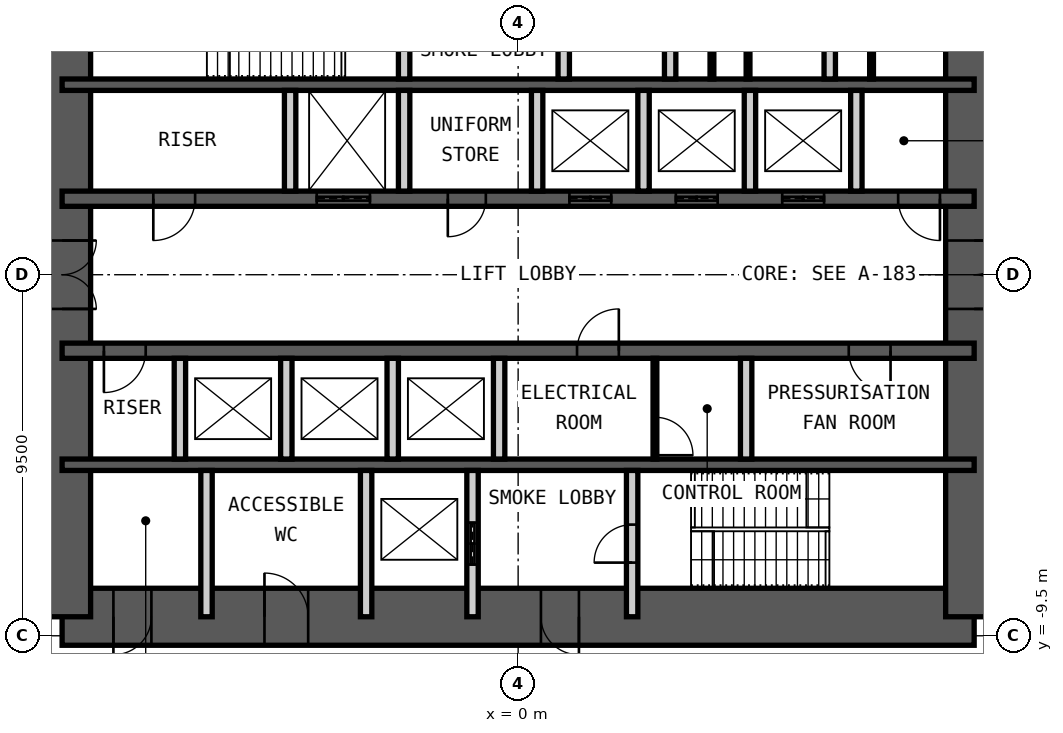
"""IFC4 building model, lengths in metres.
Left out: names, types, materials, properties, quantities, classifications, styles, units other than length and angle.
Written with IfcOpenShell. Run it as: python <this file> out.ifc"""

import sys

from ifc_helpers import new_model, si_unit, direction, frame, frame_2d, origin, place, context, subcontext, project, spatial, rectangle, extrude, element, fill, save


model = new_model("IFC4")
c1 = context("Model", 3, precision=1e-05, world=origin(), true_north=direction((0.0, 1.0)))
c2 = subcontext(c1, "Body", "Model", "MODEL_VIEW")
j1 = project(units=[si_unit("LENGTHUNIT", "METRE"), si_unit("PLANEANGLEUNIT", "RADIAN")], contexts=[c1])
p1 = place(None, origin())
s1 = spatial("IfcSite", under=j1, at=p1, CompositionType="ELEMENT")
p2 = place(p1, origin())
s2 = spatial("IfcBuilding", under=s1, at=p2, CompositionType="ELEMENT")
p3 = place(p2, frame((0.0, 0.0, 42.0)))
s3 = spatial("IfcBuildingStorey", under=s2, at=p3, CompositionType="ELEMENT", Elevation=42.0)
p4 = place(p3, frame((-12.0, -9.0, 0.0), z_axis=(0.0, 0.0, 1.0), x_axis=(1.0, 0.0, 0.0)))
e1 = element("IfcWall", 1, at=p4, inside=s3, PredefinedType="SHEAR", context=c2, shape_type="SweptSolid", body=[
    extrude(rectangle(XDim=24.0, YDim=1.5, at=frame_2d((12.0, 0.0))), origin(), (0.0, 0.0, 1.0), 5.0),
])
p5 = place(p4, frame((1.35, 0.0, 0.0)))
e2 = element("IfcOpeningElement", 2, at=p5, cuts=e1, PredefinedType="OPENING", context=c2, shape_type="SweptSolid", body=[
    extrude(rectangle(XDim=1.0, YDim=2.1, at=frame_2d((0.5, 1.05))), frame((0.0, 0.76, 0.0), z_axis=(0.0, -1.0, 0.0), x_axis=(1.0, 0.0, 0.0)), (0.0, 0.0, 1.0), 1.52),
])
p6 = place(p4, frame((5.325, 0.0, 0.0)))
e3 = element("IfcOpeningElement", 3, at=p6, cuts=e1, PredefinedType="OPENING", context=c2, shape_type="SweptSolid", body=[
    extrude(rectangle(XDim=1.15, YDim=2.1, at=frame_2d((0.575, 1.05))), frame((0.0, 0.76, 0.0), z_axis=(0.0, -1.0, 0.0), x_axis=(1.0, 0.0, 0.0)), (0.0, 0.0, 1.0), 1.52),
])
p7 = place(p4, frame((12.6, 0.0, 0.0)))
e4 = element("IfcOpeningElement", 4, at=p7, cuts=e1, PredefinedType="OPENING", context=c2, shape_type="SweptSolid", body=[
    extrude(rectangle(XDim=1.0, YDim=2.1, at=frame_2d((0.5, 1.05))), frame((0.0, 0.76, 0.0), z_axis=(0.0, -1.0, 0.0), x_axis=(1.0, 0.0, 0.0)), (0.0, 0.0, 1.0), 1.52),
])
p8 = place(p3, frame((12.0, -9.0, 0.0), z_axis=(0.0, 0.0, 1.0), x_axis=(0.0, 1.0, 0.0)))
e5 = element("IfcWall", 5, at=p8, inside=s3, PredefinedType="SHEAR", context=c2, shape_type="SweptSolid", body=[
    extrude(rectangle(XDim=18.0, YDim=1.5, at=frame_2d((9.0, 0.0))), origin(), (0.0, 0.0, 1.0), 5.0),
])
p9 = place(p8, frame((8.1, 0.0, 0.0)))
e6 = element("IfcOpeningElement", 6, at=p9, cuts=e5, PredefinedType="OPENING", context=c2, shape_type="SweptSolid", body=[
    extrude(rectangle(XDim=1.8, YDim=2.1, at=frame_2d((0.9, 1.05))), frame((0.0, 0.76, 0.0), z_axis=(0.0, -1.0, 0.0), x_axis=(1.0, 0.0, 0.0)), (0.0, 0.0, 1.0), 1.52),
])
p10 = place(p3, frame((-12.0, -9.0, 0.0), z_axis=(0.0, 0.0, 1.0), x_axis=(0.0, 1.0, 0.0)))
e7 = element("IfcWall", 7, at=p10, inside=s3, PredefinedType="SHEAR", context=c2, shape_type="SweptSolid", body=[
    extrude(rectangle(XDim=18.0, YDim=1.5, at=frame_2d((9.0, 0.0))), origin(), (0.0, 0.0, 1.0), 5.0),
])
p11 = place(p10, frame((8.1, 0.0, 0.0)))
e8 = element("IfcOpeningElement", 8, at=p11, cuts=e7, PredefinedType="OPENING", context=c2, shape_type="SweptSolid", body=[
    extrude(rectangle(XDim=1.8, YDim=2.1, at=frame_2d((0.9, 1.05))), frame((0.0, 0.76, 0.0), z_axis=(0.0, -1.0, 0.0), x_axis=(1.0, 0.0, 0.0)), (0.0, 0.0, 1.0), 1.52),
])
p12 = place(p3, frame((-12.0, 5.0, 0.0), z_axis=(0.0, 0.0, 1.0), x_axis=(1.0, 0.0, 0.0)))
e9 = element("IfcWall", 9, at=p12, inside=s3, PredefinedType="SHEAR", context=c2, shape_type="SweptSolid", body=[
    extrude(rectangle(XDim=24.0, YDim=0.3, at=frame_2d((12.0, 0.0))), origin(), (0.0, 0.0, 1.0), 5.0),
])
p13 = place(p3, frame((-12.0, 2.0, 0.0), z_axis=(0.0, 0.0, 1.0), x_axis=(1.0, 0.0, 0.0)))
e10 = element("IfcWall", 10, at=p13, inside=s3, PredefinedType="SHEAR", context=c2, shape_type="SweptSolid", body=[
    extrude(rectangle(XDim=24.0, YDim=0.4, at=frame_2d((12.0, 0.0))), origin(), (0.0, 0.0, 1.0), 5.0),
])
p14 = place(p13, frame((2.4, 0.0, 0.0)))
e11 = element("IfcOpeningElement", 11, at=p14, cuts=e10, PredefinedType="OPENING", context=c2, shape_type="SweptSolid", body=[
    extrude(rectangle(XDim=1.1, YDim=2.1, at=frame_2d((0.55, 1.05))), frame((0.0, 0.21, 0.0), z_axis=(0.0, -1.0, 0.0), x_axis=(1.0, 0.0, 0.0)), (0.0, 0.0, 1.0), 0.42),
])
p15 = place(p13, frame((22.0, 0.0, 0.0)))
e12 = element("IfcOpeningElement", 12, at=p15, cuts=e10, PredefinedType="OPENING", context=c2, shape_type="SweptSolid", body=[
    extrude(rectangle(XDim=1.1, YDim=2.1, at=frame_2d((0.55, 1.05))), frame((0.0, 0.21, 0.0), z_axis=(0.0, -1.0, 0.0), x_axis=(1.0, 0.0, 0.0)), (0.0, 0.0, 1.0), 0.42),
])
p16 = place(p13, frame((10.15, 0.0, 0.0)))
e13 = element("IfcOpeningElement", 13, at=p16, cuts=e10, PredefinedType="OPENING", context=c2, shape_type="SweptSolid", body=[
    extrude(rectangle(XDim=1.0, YDim=2.1, at=frame_2d((0.5, 1.05))), frame((0.0, 0.21, 0.0), z_axis=(0.0, -1.0, 0.0), x_axis=(1.0, 0.0, 0.0)), (0.0, 0.0, 1.0), 0.42),
])
p17 = place(p13, frame((6.7, 0.0, 0.0)))
e14 = element("IfcOpeningElement", 14, at=p17, cuts=e10, PredefinedType="OPENING", context=c2, shape_type="SweptSolid", body=[
    extrude(rectangle(XDim=1.4, YDim=2.4, at=frame_2d((0.7, 1.2))), frame((0.0, 0.21, 0.0), z_axis=(0.0, -1.0, 0.0), x_axis=(1.0, 0.0, 0.0)), (0.0, 0.0, 1.0), 0.42),
])
p18 = place(p13, frame((13.35, 0.0, 0.0)))
e15 = element("IfcOpeningElement", 15, at=p18, cuts=e10, PredefinedType="OPENING", context=c2, shape_type="SweptSolid", body=[
    extrude(rectangle(XDim=1.1, YDim=2.4, at=frame_2d((0.55, 1.2))), frame((0.0, 0.21, 0.0), z_axis=(0.0, -1.0, 0.0), x_axis=(1.0, 0.0, 0.0)), (0.0, 0.0, 1.0), 0.42),
])
p19 = place(p13, frame((16.15, 0.0, 0.0)))
e16 = element("IfcOpeningElement", 16, at=p19, cuts=e10, PredefinedType="OPENING", context=c2, shape_type="SweptSolid", body=[
    extrude(rectangle(XDim=1.1, YDim=2.4, at=frame_2d((0.55, 1.2))), frame((0.0, 0.21, 0.0), z_axis=(0.0, -1.0, 0.0), x_axis=(1.0, 0.0, 0.0)), (0.0, 0.0, 1.0), 0.42),
])
p20 = place(p13, frame((18.95, 0.0, 0.0)))
e17 = element("IfcOpeningElement", 17, at=p20, cuts=e10, PredefinedType="OPENING", context=c2, shape_type="SweptSolid", body=[
    extrude(rectangle(XDim=1.1, YDim=2.4, at=frame_2d((0.55, 1.2))), frame((0.0, 0.21, 0.0), z_axis=(0.0, -1.0, 0.0), x_axis=(1.0, 0.0, 0.0)), (0.0, 0.0, 1.0), 0.42),
])
p21 = place(p3, frame((-12.0, -2.0, 0.0), z_axis=(0.0, 0.0, 1.0), x_axis=(1.0, 0.0, 0.0)))
e18 = element("IfcWall", 18, at=p21, inside=s3, PredefinedType="SHEAR", context=c2, shape_type="SweptSolid", body=[
    extrude(rectangle(XDim=24.0, YDim=0.4, at=frame_2d((12.0, 0.0))), origin(), (0.0, 0.0, 1.0), 5.0),
])
p22 = place(p21, frame((1.1, 0.0, 0.0)))
e19 = element("IfcOpeningElement", 19, at=p22, cuts=e18, PredefinedType="OPENING", context=c2, shape_type="SweptSolid", body=[
    extrude(rectangle(XDim=1.1, YDim=2.1, at=frame_2d((0.55, 1.05))), frame((0.0, 0.21, 0.0), z_axis=(0.0, -1.0, 0.0), x_axis=(1.0, 0.0, 0.0)), (0.0, 0.0, 1.0), 0.42),
])
p23 = place(p21, frame((13.55, 0.0, 0.0)))
e20 = element("IfcOpeningElement", 20, at=p23, cuts=e18, PredefinedType="OPENING", context=c2, shape_type="SweptSolid", body=[
    extrude(rectangle(XDim=1.1, YDim=2.1, at=frame_2d((0.55, 1.05))), frame((0.0, 0.21, 0.0), z_axis=(0.0, -1.0, 0.0), x_axis=(1.0, 0.0, 0.0)), (0.0, 0.0, 1.0), 0.42),
])
p24 = place(p21, frame((20.7, 0.0, 0.0)))
e21 = element("IfcOpeningElement", 21, at=p24, cuts=e18, PredefinedType="OPENING", context=c2, shape_type="SweptSolid", body=[
    extrude(rectangle(XDim=1.1, YDim=2.1, at=frame_2d((0.55, 1.05))), frame((0.0, 0.21, 0.0), z_axis=(0.0, -1.0, 0.0), x_axis=(1.0, 0.0, 0.0)), (0.0, 0.0, 1.0), 0.42),
])
p25 = place(p3, frame((-12.0, -5.0, 0.0), z_axis=(0.0, 0.0, 1.0), x_axis=(1.0, 0.0, 0.0)))
e22 = element("IfcWall", 22, at=p25, inside=s3, PredefinedType="SHEAR", context=c2, shape_type="SweptSolid", body=[
    extrude(rectangle(XDim=24.0, YDim=0.3, at=frame_2d((12.0, 0.0))), origin(), (0.0, 0.0, 1.0), 5.0),
])
p26 = place(p3, frame((-3.0, 5.15, 0.0), z_axis=(0.0, 0.0, 1.0), x_axis=(0.0, 1.0, 0.0)))
e23 = element("IfcWall", 23, at=p26, inside=s3, PredefinedType="PARTITIONING", context=c2, shape_type="SweptSolid", body=[
    extrude(rectangle(XDim=3.85, YDim=0.3, at=frame_2d((1.925, 0.0))), origin(), (0.0, 0.0, 1.0), 4.78),
])
p27 = place(p26, frame((1.425, 0.0, 0.0)))
e24 = element("IfcOpeningElement", 24, at=p27, cuts=e23, PredefinedType="OPENING", context=c2, shape_type="SweptSolid", body=[
    extrude(rectangle(XDim=1.0, YDim=2.1, at=frame_2d((0.5, 1.05))), frame((0.0, 0.16, 0.0), z_axis=(0.0, -1.0, 0.0), x_axis=(1.0, 0.0, 0.0)), (0.0, 0.0, 1.0), 0.32),
])
p28 = place(p3, frame((1.2, 5.15, 0.0), z_axis=(0.0, 0.0, 1.0), x_axis=(0.0, 1.0, 0.0)))
e25 = element("IfcWall", 25, at=p28, inside=s3, PredefinedType="PARTITIONING", context=c2, shape_type="SweptSolid", body=[
    extrude(rectangle(XDim=3.85, YDim=0.3, at=frame_2d((1.925, 0.0))), origin(), (0.0, 0.0, 1.0), 4.78),
])
p29 = place(p28, frame((1.375, 0.0, 0.0)))
e26 = element("IfcOpeningElement", 26, at=p29, cuts=e25, PredefinedType="OPENING", context=c2, shape_type="SweptSolid", body=[
    extrude(rectangle(XDim=1.1, YDim=2.4, at=frame_2d((0.55, 1.2))), frame((0.0, 0.16, 0.0), z_axis=(0.0, -1.0, 0.0), x_axis=(1.0, 0.0, 0.0)), (0.0, 0.0, 1.0), 0.32),
])
for number, where, z_axis, x_axis in (
    (27, (4.0, 5.15, 0.0), (0.0, 0.0, 1.0), (0.0, 1.0, 0.0)),
    (28, (8.2, 5.15, 0.0), (0.0, 0.0, 1.0), (0.0, 1.0, 0.0)),
):
    element("IfcWall", number, at=place(p3, frame(where, z_axis=z_axis, x_axis=x_axis)), inside=s3, PredefinedType="PARTITIONING", context=c2, shape_type="SweptSolid", body=[
        extrude(rectangle(XDim=3.85, YDim=0.3, at=frame_2d((1.925, 0.0))), origin(), (0.0, 0.0, 1.0), 4.78),
    ])
for number, where, z_axis, x_axis in (
    (29, (-6.0, 2.2, 0.0), (0.0, 0.0, 1.0), (0.0, 1.0, 0.0)),
    (30, (-3.0, 2.2, 0.0), (0.0, 0.0, 1.0), (0.0, 1.0, 0.0)),
    (31, (0.5, 2.2, 0.0), (0.0, 0.0, 1.0), (0.0, 1.0, 0.0)),
    (32, (3.3, 2.2, 0.0), (0.0, 0.0, 1.0), (0.0, 1.0, 0.0)),
    (33, (6.1, 2.2, 0.0), (0.0, 0.0, 1.0), (0.0, 1.0, 0.0)),
    (34, (8.9, 2.2, 0.0), (0.0, 0.0, 1.0), (0.0, 1.0, 0.0)),
    (35, (-8.9, -4.85, 0.0), (0.0, 0.0, 1.0), (0.0, 1.0, 0.0)),
    (36, (-6.1, -4.85, 0.0), (0.0, 0.0, 1.0), (0.0, 1.0, 0.0)),
    (37, (-3.3, -4.85, 0.0), (0.0, 0.0, 1.0), (0.0, 1.0, 0.0)),
    (38, (-0.5, -4.85, 0.0), (0.0, 0.0, 1.0), (0.0, 1.0, 0.0)),
    (39, (6.0, -4.85, 0.0), (0.0, 0.0, 1.0), (0.0, 1.0, 0.0)),
):
    element("IfcWall", number, at=place(p3, frame(where, z_axis=z_axis, x_axis=x_axis)), inside=s3, PredefinedType="PARTITIONING", context=c2, shape_type="SweptSolid", body=[
        extrude(rectangle(XDim=2.65, YDim=0.3, at=frame_2d((1.325, 0.0))), origin(), (0.0, 0.0, 1.0), 4.78),
    ])
for number, where, z_axis, x_axis in (
    (40, (-8.2, -9.0, 0.0), (0.0, 0.0, 1.0), (0.0, 1.0, 0.0)),
    (41, (-4.0, -9.0, 0.0), (0.0, 0.0, 1.0), (0.0, 1.0, 0.0)),
):
    element("IfcWall", number, at=place(p3, frame(where, z_axis=z_axis, x_axis=x_axis)), inside=s3, PredefinedType="PARTITIONING", context=c2, shape_type="SweptSolid", body=[
        extrude(rectangle(XDim=3.85, YDim=0.3, at=frame_2d((1.925, 0.0))), origin(), (0.0, 0.0, 1.0), 4.78),
    ])
p30 = place(p3, frame((-1.2, -9.0, 0.0), z_axis=(0.0, 0.0, 1.0), x_axis=(0.0, 1.0, 0.0)))
e42 = element("IfcWall", 42, at=p30, inside=s3, PredefinedType="PARTITIONING", context=c2, shape_type="SweptSolid", body=[
    extrude(rectangle(XDim=3.85, YDim=0.3, at=frame_2d((1.925, 0.0))), origin(), (0.0, 0.0, 1.0), 4.78),
])
p31 = place(p30, frame((1.375, 0.0, 0.0)))
e43 = element("IfcOpeningElement", 43, at=p31, cuts=e42, PredefinedType="OPENING", context=c2, shape_type="SweptSolid", body=[
    extrude(rectangle(XDim=1.1, YDim=2.4, at=frame_2d((0.55, 1.2))), frame((0.0, 0.16, 0.0), z_axis=(0.0, -1.0, 0.0), x_axis=(1.0, 0.0, 0.0)), (0.0, 0.0, 1.0), 0.32),
])
p32 = place(p3, frame((3.0, -9.0, 0.0), z_axis=(0.0, 0.0, 1.0), x_axis=(0.0, 1.0, 0.0)))
e44 = element("IfcWall", 44, at=p32, inside=s3, PredefinedType="PARTITIONING", context=c2, shape_type="SweptSolid", body=[
    extrude(rectangle(XDim=3.85, YDim=0.3, at=frame_2d((1.925, 0.0))), origin(), (0.0, 0.0, 1.0), 4.78),
])
p33 = place(p32, frame((1.425, 0.0, 0.0)))
e45 = element("IfcOpeningElement", 45, at=p33, cuts=e44, PredefinedType="OPENING", context=c2, shape_type="SweptSolid", body=[
    extrude(rectangle(XDim=1.0, YDim=2.1, at=frame_2d((0.5, 1.05))), frame((0.0, 0.16, 0.0), z_axis=(0.0, -1.0, 0.0), x_axis=(1.0, 0.0, 0.0)), (0.0, 0.0, 1.0), 0.32),
])
p34 = place(p3, frame((3.6, -4.85, 0.0), z_axis=(0.0, 0.0, 1.0), x_axis=(0.0, 1.0, 0.0)))
e46 = element("IfcWall", 46, at=p34, inside=s3, PredefinedType="PARTITIONING", context=c2, shape_type="SweptSolid", body=[
    extrude(rectangle(XDim=2.65, YDim=0.1, at=frame_2d((1.325, 0.0))), origin(), (0.0, 0.0, 1.0), 4.78),
])
p35 = place(p34, frame((0.1, 0.0, 0.0)))
e47 = element("IfcOpeningElement", 47, at=p35, cuts=e46, PredefinedType="OPENING", context=c2, shape_type="SweptSolid", body=[
    extrude(rectangle(XDim=1.0, YDim=2.4, at=frame_2d((0.5, 1.2))), frame((0.0, 0.06, 0.0), z_axis=(0.0, -1.0, 0.0), x_axis=(1.0, 0.0, 0.0)), (0.0, 0.0, 1.0), 0.12),
])
for number, where, z_axis, x_axis in (
    (48, (5.1, 5.15, 0.0), (0.0, 0.0, 1.0), (0.0, 1.0, 0.0)),
    (49, (6.05, 5.15, 0.0), (0.0, 0.0, 1.0), (0.0, 1.0, 0.0)),
    (50, (9.3, 5.15, 0.0), (0.0, 0.0, 1.0), (0.0, 1.0, 0.0)),
):
    element("IfcWall", number, at=place(p3, frame(where, z_axis=z_axis, x_axis=x_axis)), inside=s3, PredefinedType="PARTITIONING", context=c2, shape_type="SweptSolid", body=[
        extrude(rectangle(XDim=1.5, YDim=0.1, at=frame_2d((0.75, 0.0))), origin(), (0.0, 0.0, 1.0), 2.1),
    ])
p36 = place(p5, origin())
e51 = element("IfcDoor", 51, at=p36, inside=s3, OperationType="SINGLE_SWING_LEFT", PredefinedType="DOOR", context=c2, shape_type="SweptSolid", body=[
    extrude(rectangle(XDim=1.0, YDim=2.1, at=frame_2d((0.5, 1.05))), frame((0.0, 0.025, 0.0), z_axis=(0.0, -1.0, 0.0), x_axis=(1.0, 0.0, 0.0)), (0.0, 0.0, 1.0), 0.05),
])
fill(e2, e51)
p37 = place(p6, origin())
e52 = element("IfcDoor", 52, at=p37, inside=s3, OperationType="SINGLE_SWING_RIGHT", PredefinedType="DOOR", context=c2, shape_type="SweptSolid", body=[
    extrude(rectangle(XDim=1.15, YDim=2.1, at=frame_2d((0.575, 1.05))), frame((0.0, 0.025, 0.0), z_axis=(0.0, -1.0, 0.0), x_axis=(1.0, 0.0, 0.0)), (0.0, 0.0, 1.0), 0.05),
])
fill(e3, e52)
p38 = place(p7, origin())
e53 = element("IfcDoor", 53, at=p38, inside=s3, OperationType="SINGLE_SWING_RIGHT", PredefinedType="DOOR", context=c2, shape_type="SweptSolid", body=[
    extrude(rectangle(XDim=1.0, YDim=2.1, at=frame_2d((0.5, 1.05))), frame((0.0, 0.025, 0.0), z_axis=(0.0, -1.0, 0.0), x_axis=(1.0, 0.0, 0.0)), (0.0, 0.0, 1.0), 0.05),
])
fill(e4, e53)
p39 = place(p33, origin())
e54 = element("IfcDoor", 54, at=p39, inside=s3, OperationType="SINGLE_SWING_RIGHT", PredefinedType="DOOR", context=c2, shape_type="SweptSolid", body=[
    extrude(rectangle(XDim=1.0, YDim=2.1, at=frame_2d((0.5, 1.05))), frame((0.0, 0.025, 0.0), z_axis=(0.0, -1.0, 0.0), x_axis=(1.0, 0.0, 0.0)), (0.0, 0.0, 1.0), 0.05),
])
fill(e45, e54)
p40 = place(p14, origin())
e55 = element("IfcDoor", 55, at=p40, inside=s3, OperationType="SINGLE_SWING_LEFT", PredefinedType="DOOR", context=c2, shape_type="SweptSolid", body=[
    extrude(rectangle(XDim=1.1, YDim=2.1, at=frame_2d((0.55, 1.05))), frame((0.0, 0.025, 0.0), z_axis=(0.0, -1.0, 0.0), x_axis=(1.0, 0.0, 0.0)), (0.0, 0.0, 1.0), 0.05),
])
fill(e11, e55)
p41 = place(p22, origin())
e56 = element("IfcDoor", 56, at=p41, inside=s3, OperationType="SINGLE_SWING_LEFT", PredefinedType="DOOR", context=c2, shape_type="SweptSolid", body=[
    extrude(rectangle(XDim=1.1, YDim=2.1, at=frame_2d((0.55, 1.05))), frame((0.0, 0.025, 0.0), z_axis=(0.0, -1.0, 0.0), x_axis=(1.0, 0.0, 0.0)), (0.0, 0.0, 1.0), 0.05),
])
fill(e19, e56)
p42 = place(p15, origin())
e57 = element("IfcDoor", 57, at=p42, inside=s3, OperationType="SINGLE_SWING_RIGHT", PredefinedType="DOOR", context=c2, shape_type="SweptSolid", body=[
    extrude(rectangle(XDim=1.1, YDim=2.1, at=frame_2d((0.55, 1.05))), frame((0.0, 0.025, 0.0), z_axis=(0.0, -1.0, 0.0), x_axis=(1.0, 0.0, 0.0)), (0.0, 0.0, 1.0), 0.05),
])
fill(e12, e57)
p43 = place(p16, origin())
e58 = element("IfcDoor", 58, at=p43, inside=s3, OperationType="SINGLE_SWING_LEFT", PredefinedType="DOOR", context=c2, shape_type="SweptSolid", body=[
    extrude(rectangle(XDim=1.0, YDim=2.1, at=frame_2d((0.5, 1.05))), frame((0.0, 0.025, 0.0), z_axis=(0.0, -1.0, 0.0), x_axis=(1.0, 0.0, 0.0)), (0.0, 0.0, 1.0), 0.05),
])
fill(e13, e58)
p44 = place(p23, origin())
e59 = element("IfcDoor", 59, at=p44, inside=s3, OperationType="SINGLE_SWING_LEFT", PredefinedType="DOOR", context=c2, shape_type="SweptSolid", body=[
    extrude(rectangle(XDim=1.1, YDim=2.1, at=frame_2d((0.55, 1.05))), frame((0.0, 0.025, 0.0), z_axis=(0.0, -1.0, 0.0), x_axis=(1.0, 0.0, 0.0)), (0.0, 0.0, 1.0), 0.05),
])
fill(e20, e59)
p45 = place(p24, origin())
e60 = element("IfcDoor", 60, at=p45, inside=s3, OperationType="SINGLE_SWING_RIGHT", PredefinedType="DOOR", context=c2, shape_type="SweptSolid", body=[
    extrude(rectangle(XDim=1.1, YDim=2.1, at=frame_2d((0.55, 1.05))), frame((0.0, 0.025, 0.0), z_axis=(0.0, -1.0, 0.0), x_axis=(1.0, 0.0, 0.0)), (0.0, 0.0, 1.0), 0.05),
])
fill(e21, e60)
p46 = place(p9, origin())
e61 = element("IfcDoor", 61, at=p46, inside=s3, OperationType="DOUBLE_DOOR_DOUBLE_SWING", PredefinedType="DOOR", context=c2, shape_type="SweptSolid", body=[
    extrude(rectangle(XDim=1.8, YDim=2.1, at=frame_2d((0.9, 1.05))), frame((0.0, 0.025, 0.0), z_axis=(0.0, -1.0, 0.0), x_axis=(1.0, 0.0, 0.0)), (0.0, 0.0, 1.0), 0.05),
])
fill(e6, e61)
p47 = place(p11, origin())
e62 = element("IfcDoor", 62, at=p47, inside=s3, OperationType="DOUBLE_DOOR_DOUBLE_SWING", PredefinedType="DOOR", context=c2, shape_type="SweptSolid", body=[
    extrude(rectangle(XDim=1.8, YDim=2.1, at=frame_2d((0.9, 1.05))), frame((0.0, 0.025, 0.0), z_axis=(0.0, -1.0, 0.0), x_axis=(1.0, 0.0, 0.0)), (0.0, 0.0, 1.0), 0.05),
])
fill(e8, e62)
p48 = place(p31, origin())
e63 = element("IfcDoor", 63, at=p48, inside=s3, OperationType="DOUBLE_DOOR_SLIDING", PredefinedType="DOOR", context=c2, shape_type="SweptSolid", body=[
    extrude(rectangle(XDim=1.1, YDim=2.4, at=frame_2d((0.55, 1.2))), frame((0.0, 0.025, 0.0), z_axis=(0.0, -1.0, 0.0), x_axis=(1.0, 0.0, 0.0)), (0.0, 0.0, 1.0), 0.05),
])
fill(e43, e63)
p49 = place(p17, origin())
e64 = element("IfcDoor", 64, at=p49, inside=s3, OperationType="DOUBLE_DOOR_SLIDING", PredefinedType="DOOR", context=c2, shape_type="SweptSolid", body=[
    extrude(rectangle(XDim=1.4, YDim=2.4, at=frame_2d((0.7, 1.2))), frame((0.0, 0.025, 0.0), z_axis=(0.0, -1.0, 0.0), x_axis=(1.0, 0.0, 0.0)), (0.0, 0.0, 1.0), 0.05),
])
fill(e14, e64)
p50 = place(p18, origin())
e65 = element("IfcDoor", 65, at=p50, inside=s3, OperationType="DOUBLE_DOOR_SLIDING", PredefinedType="DOOR", context=c2, shape_type="SweptSolid", body=[
    extrude(rectangle(XDim=1.1, YDim=2.4, at=frame_2d((0.55, 1.2))), frame((0.0, 0.025, 0.0), z_axis=(0.0, -1.0, 0.0), x_axis=(1.0, 0.0, 0.0)), (0.0, 0.0, 1.0), 0.05),
])
fill(e15, e65)
p51 = place(p19, origin())
e66 = element("IfcDoor", 66, at=p51, inside=s3, OperationType="DOUBLE_DOOR_SLIDING", PredefinedType="DOOR", context=c2, shape_type="SweptSolid", body=[
    extrude(rectangle(XDim=1.1, YDim=2.4, at=frame_2d((0.55, 1.2))), frame((0.0, 0.025, 0.0), z_axis=(0.0, -1.0, 0.0), x_axis=(1.0, 0.0, 0.0)), (0.0, 0.0, 1.0), 0.05),
])
fill(e16, e66)
p52 = place(p20, origin())
e67 = element("IfcDoor", 67, at=p52, inside=s3, OperationType="DOUBLE_DOOR_SLIDING", PredefinedType="DOOR", context=c2, shape_type="SweptSolid", body=[
    extrude(rectangle(XDim=1.1, YDim=2.4, at=frame_2d((0.55, 1.2))), frame((0.0, 0.025, 0.0), z_axis=(0.0, -1.0, 0.0), x_axis=(1.0, 0.0, 0.0)), (0.0, 0.0, 1.0), 0.05),
])
fill(e17, e67)
p53 = place(p35, origin())
e68 = element("IfcDoor", 68, at=p53, inside=s3, OperationType="SINGLE_SWING_LEFT", PredefinedType="DOOR", context=c2, shape_type="SweptSolid", body=[
    extrude(rectangle(XDim=1.0, YDim=2.4, at=frame_2d((0.5, 1.2))), frame((0.0, 0.025, 0.0), z_axis=(0.0, -1.0, 0.0), x_axis=(1.0, 0.0, 0.0)), (0.0, 0.0, 1.0), 0.05),
])
fill(e47, e68)
save(model, sys.argv[1])
